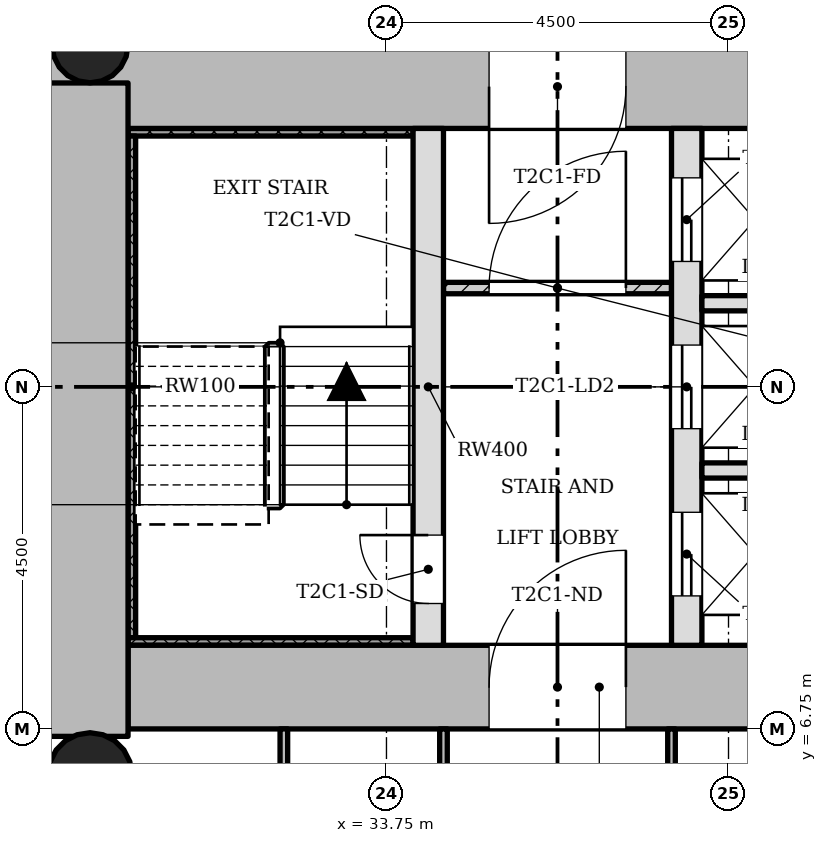
"""IFC4 building model, lengths in metres.
Left out: names, types, materials, properties, quantities, classifications, styles, units other than length and angle.
Written with IfcOpenShell. Run it as: python <this file> out.ifc"""

import sys

from ifc_helpers import new_model, si_unit, direction, frame, frame_2d, origin, origin_2d, place, context, subcontext, project, spatial, rectangle, hollow_circle, extrude, element, fill, save


model = new_model("IFC4")
c1 = context("Model", 3, precision=1e-05, world=origin(), true_north=direction((0.0, 1.0)))
c2 = subcontext(c1, "Body", "Model", "MODEL_VIEW")
j1 = project(units=[si_unit("LENGTHUNIT", "METRE"), si_unit("PLANEANGLEUNIT", "RADIAN")], contexts=[c1])
p1 = place(None, origin())
s1 = spatial("IfcSite", under=j1, at=p1, CompositionType="ELEMENT")
p2 = place(p1, origin())
s2 = spatial("IfcBuilding", under=s1, at=p2, CompositionType="ELEMENT")
p3 = place(p2, frame((0.0, 0.0, 44.9)))
s3 = spatial("IfcBuildingStorey", under=s2, at=p3, CompositionType="ELEMENT", Elevation=44.9)
p4 = place(p3, frame((30.35, 7.3, 0.0), z_axis=(0.0, 0.0, 1.0), x_axis=(1.0, 0.0, 0.0)))
e1 = element("IfcWall", 1, at=p4, inside=s3, PredefinedType="SHEAR", context=c2, shape_type="SweptSolid", body=[
    extrude(rectangle(XDim=12.4, YDim=1.1, at=frame_2d((6.2, 0.0))), origin(), (0.0, 0.0, 1.0), 3.4),
])
p5 = place(p4, frame((4.75, 0.0, 0.0)))
e2 = element("IfcOpeningElement", 2, at=p5, cuts=e1, PredefinedType="OPENING", context=c2, shape_type="SweptSolid", body=[
    extrude(rectangle(XDim=1.8, YDim=2.1, at=frame_2d((0.9, 1.05))), frame((0.0, 0.56, 0.0), z_axis=(0.0, -1.0, 0.0), x_axis=(1.0, 0.0, 0.0)), (0.0, 0.0, 1.0), 1.12),
])
p6 = place(p3, frame((41.65, 15.2, 0.0), z_axis=(0.0, 0.0, 1.0), x_axis=(-1.0, 0.0, 0.0)))
e3 = element("IfcWall", 3, at=p6, inside=s3, PredefinedType="SHEAR", context=c2, shape_type="SweptSolid", body=[
    extrude(rectangle(XDim=12.4, YDim=1.1, at=frame_2d((6.2, 0.0))), origin(), (0.0, 0.0, 1.0), 3.4),
])
p7 = place(p6, frame((4.75, 0.0, 0.0)))
e4 = element("IfcOpeningElement", 4, at=p7, cuts=e3, PredefinedType="OPENING", context=c2, shape_type="SweptSolid", body=[
    extrude(rectangle(XDim=1.8, YDim=2.1, at=frame_2d((0.9, 1.05))), frame((0.0, 0.56, 0.0), z_axis=(0.0, -1.0, 0.0), x_axis=(1.0, 0.0, 0.0)), (0.0, 0.0, 1.0), 1.12),
])
p8 = place(p3, frame((29.8, 15.248, 0.0), z_axis=(0.0, 0.0, 1.0), x_axis=(0.0, -1.0, 0.0)))
e5 = element("IfcWall", 5, at=p8, inside=s3, PredefinedType="SHEAR", context=c2, shape_type="SweptSolid", body=[
    extrude(rectangle(XDim=8.596, YDim=1.1, at=frame_2d((4.298, 0.0))), origin(), (0.0, 0.0, 1.0), 3.4),
])
p9 = place(p3, frame((34.3, 7.85, 0.0), z_axis=(0.0, 0.0, 1.0), x_axis=(0.0, 1.0, 0.0)))
e6 = element("IfcWall", 6, at=p9, inside=s3, PredefinedType="SHEAR", context=c2, shape_type="SweptSolid", body=[
    extrude(rectangle(XDim=6.8, YDim=0.4, at=frame_2d((3.4, 0.0))), origin(), (0.0, 0.0, 1.0), 3.4),
])
p10 = place(p9, frame((0.55, 0.0, 0.0)))
e7 = element("IfcOpeningElement", 7, at=p10, cuts=e6, PredefinedType="OPENING", context=c2, shape_type="SweptSolid", body=[
    extrude(rectangle(XDim=0.9, YDim=2.1, at=frame_2d((0.45, 1.05))), frame((0.0, 0.21, 0.0), z_axis=(0.0, -1.0, 0.0), x_axis=(1.0, 0.0, 0.0)), (0.0, 0.0, 1.0), 0.42),
])
p11 = place(p3, frame((37.7, 7.85, 0.0), z_axis=(0.0, 0.0, 1.0), x_axis=(0.0, 1.0, 0.0)))
e8 = element("IfcWall", 8, at=p11, inside=s3, PredefinedType="SHEAR", context=c2, shape_type="SweptSolid", body=[
    extrude(rectangle(XDim=6.8, YDim=0.4, at=frame_2d((3.4, 0.0))), origin(), (0.0, 0.0, 1.0), 3.4),
])
p12 = place(p11, frame((0.65, 0.0, 0.0)))
e9 = element("IfcOpeningElement", 9, at=p12, cuts=e8, PredefinedType="OPENING", context=c2, shape_type="SweptSolid", body=[
    extrude(rectangle(XDim=1.1, YDim=2.1, at=frame_2d((0.55, 1.05))), frame((0.0, 0.21, 0.0), z_axis=(0.0, -1.0, 0.0), x_axis=(1.0, 0.0, 0.0)), (0.0, 0.0, 1.0), 0.42),
])
p13 = place(p11, frame((2.85, 0.0, 0.0)))
e10 = element("IfcOpeningElement", 10, at=p13, cuts=e8, PredefinedType="OPENING", context=c2, shape_type="SweptSolid", body=[
    extrude(rectangle(XDim=1.1, YDim=2.1, at=frame_2d((0.55, 1.05))), frame((0.0, 0.21, 0.0), z_axis=(0.0, -1.0, 0.0), x_axis=(1.0, 0.0, 0.0)), (0.0, 0.0, 1.0), 0.42),
])
p14 = place(p11, frame((5.05, 0.0, 0.0)))
e11 = element("IfcOpeningElement", 11, at=p14, cuts=e8, PredefinedType="OPENING", context=c2, shape_type="SweptSolid", body=[
    extrude(rectangle(XDim=1.1, YDim=2.1, at=frame_2d((0.55, 1.05))), frame((0.0, 0.21, 0.0), z_axis=(0.0, -1.0, 0.0), x_axis=(1.0, 0.0, 0.0)), (0.0, 0.0, 1.0), 0.42),
])
p15 = place(p3, frame((29.85, 15.75, 0.0), z_axis=(0.0, 0.0, 1.0), x_axis=(1.0, 0.0, 0.0)))
e12 = element("IfcColumn", 12, at=p15, inside=s3, PredefinedType="COLUMN", context=c2, shape_type="SweptSolid", body=[
    extrude(hollow_circle(Radius=0.5, WallThickness=0.036, at=origin_2d()), origin(), (0.0, 0.0, 1.0), 3.4),
])
p16 = place(p3, frame((29.85, 6.15, 0.0), z_axis=(0.0, 0.0, 1.0), x_axis=(1.0, 0.0, 0.0)))
e13 = element("IfcColumn", 13, at=p16, inside=s3, PredefinedType="COLUMN", context=c2, shape_type="SweptSolid", body=[
    extrude(hollow_circle(Radius=0.55, WallThickness=0.04, at=origin_2d()), origin(), (0.0, 0.0, 1.0), 3.4),
])
p17 = place(p3, frame((37.5, 12.55, 0.0), z_axis=(0.0, 0.0, 1.0), x_axis=(-1.0, 0.0, 0.0)))
e14 = element("IfcWall", 14, at=p17, inside=s3, PredefinedType="PARTITIONING", context=c2, shape_type="SweptSolid", body=[
    extrude(rectangle(XDim=3.0, YDim=0.15, at=frame_2d((1.5, 0.0))), origin(), (0.0, 0.0, 1.0), 3.0),
])
p18 = place(p17, frame((0.6, 0.0, 0.0)))
e15 = element("IfcOpeningElement", 15, at=p18, cuts=e14, PredefinedType="OPENING", context=c2, shape_type="SweptSolid", body=[
    extrude(rectangle(XDim=1.8, YDim=2.1, at=frame_2d((0.9, 1.05))), frame((0.0, 0.085, 0.0), z_axis=(0.0, -1.0, 0.0), x_axis=(1.0, 0.0, 0.0)), (0.0, 0.0, 1.0), 0.17),
])
for number, where, z_axis, x_axis in (
    (16, (41.65, 10.15, 0.0), (0.0, 0.0, 1.0), (-1.0, 0.0, 0.0)),
    (17, (41.65, 12.35, 0.0), (0.0, 0.0, 1.0), (-1.0, 0.0, 0.0)),
):
    element("IfcWall", number, at=place(p3, frame(where, z_axis=z_axis, x_axis=x_axis)), inside=s3, PredefinedType="SOLIDWALL", context=c2, shape_type="SweptSolid", body=[
        extrude(rectangle(XDim=3.75, YDim=0.2, at=frame_2d((1.875, 0.0))), origin(), (0.0, 0.0, 1.0), 3.0),
    ])
p19 = place(p3, frame((37.5, 0.9, 0.0), z_axis=(0.0, 0.0, 1.0), x_axis=(0.0, 1.0, 0.0)))
e18 = element("IfcWall", 18, at=p19, inside=s3, PredefinedType="PARTITIONING", context=c2, shape_type="SweptSolid", body=[
    extrude(rectangle(XDim=5.85, YDim=0.1, at=frame_2d((2.925, 0.0))), origin(), (0.0, 0.0, 1.0), 3.0),
])
p20 = place(p19, frame((2.475, 0.0, 0.0)))
e19 = element("IfcOpeningElement", 19, at=p20, cuts=e18, PredefinedType="OPENING", context=c2, shape_type="SweptSolid", body=[
    extrude(rectangle(XDim=0.9, YDim=2.1, at=frame_2d((0.45, 1.05))), frame((0.0, 0.06, 0.0), z_axis=(0.0, -1.0, 0.0), x_axis=(1.0, 0.0, 0.0)), (0.0, 0.0, 1.0), 0.12),
])
p21 = place(p3, frame((34.5, 0.9, 0.0), z_axis=(0.0, 0.0, 1.0), x_axis=(0.0, 1.0, 0.0)))
e20 = element("IfcWall", 20, at=p21, inside=s3, PredefinedType="PARTITIONING", context=c2, shape_type="SweptSolid", body=[
    extrude(rectangle(XDim=5.85, YDim=0.1, at=frame_2d((2.925, 0.0))), origin(), (0.0, 0.0, 1.0), 3.0),
])
p22 = place(p21, frame((2.475, 0.0, 0.0)))
e21 = element("IfcOpeningElement", 21, at=p22, cuts=e20, PredefinedType="OPENING", context=c2, shape_type="SweptSolid", body=[
    extrude(rectangle(XDim=0.9, YDim=2.1, at=frame_2d((0.45, 1.05))), frame((0.0, 0.06, 0.0), z_axis=(0.0, -1.0, 0.0), x_axis=(1.0, 0.0, 0.0)), (0.0, 0.0, 1.0), 0.12),
])
p23 = place(p3, frame((32.4, 0.9, 0.0), z_axis=(0.0, 0.0, 1.0), x_axis=(0.0, 1.0, 0.0)))
e22 = element("IfcWall", 22, at=p23, inside=s3, PredefinedType="PARTITIONING", context=c2, shape_type="SweptSolid", body=[
    extrude(rectangle(XDim=5.85, YDim=0.1, at=frame_2d((2.925, 0.0))), origin(), (0.0, 0.0, 1.0), 3.0),
])
p24 = place(p3, frame((34.1, 14.6, 0.0), z_axis=(0.0, 0.0, 1.0), x_axis=(-1.0, 0.0, 0.0)))
e23 = element("IfcWall", 23, at=p24, inside=s3, PredefinedType="SHEAR", context=c2, shape_type="SweptSolid", body=[
    extrude(rectangle(XDim=3.75, YDim=0.1, at=frame_2d((1.875, 0.0))), origin(), (0.0, 0.0, 1.0), 3.4),
])
p25 = place(p3, frame((30.4, 7.95, 0.0), z_axis=(0.0, 0.0, 1.0), x_axis=(0.0, 1.0, 0.0)))
e24 = element("IfcWall", 24, at=p25, inside=s3, PredefinedType="SHEAR", context=c2, shape_type="SweptSolid", body=[
    extrude(rectangle(XDim=6.6, YDim=0.1, at=frame_2d((3.3, 0.0))), origin(), (0.0, 0.0, 1.0), 3.4),
])
p26 = place(p3, frame((34.1, 7.9, 0.0), z_axis=(0.0, 0.0, 1.0), x_axis=(-1.0, 0.0, 0.0)))
e25 = element("IfcWall", 25, at=p26, inside=s3, PredefinedType="SHEAR", context=c2, shape_type="SweptSolid", body=[
    extrude(rectangle(XDim=3.75, YDim=0.1, at=frame_2d((1.875, 0.0))), origin(), (0.0, 0.0, 1.0), 3.4),
])
p27 = place(p18, origin())
e26 = element("IfcDoor", 26, at=p27, inside=s3, OperationType="SINGLE_SWING_LEFT", PredefinedType="DOOR", context=c2, shape_type="SweptSolid", body=[
    extrude(rectangle(XDim=1.8, YDim=2.1, at=frame_2d((0.9, 1.05))), frame((0.0, 0.025, 0.0), z_axis=(0.0, -1.0, 0.0), x_axis=(1.0, 0.0, 0.0)), (0.0, 0.0, 1.0), 0.05),
])
fill(e15, e26)
p28 = place(p10, origin())
e27 = element("IfcDoor", 27, at=p28, inside=s3, OperationType="SINGLE_SWING_LEFT", PredefinedType="DOOR", context=c2, shape_type="SweptSolid", body=[
    extrude(rectangle(XDim=0.9, YDim=2.1, at=frame_2d((0.45, 1.05))), frame((0.0, 0.025, 0.0), z_axis=(0.0, -1.0, 0.0), x_axis=(1.0, 0.0, 0.0)), (0.0, 0.0, 1.0), 0.05),
])
fill(e7, e27)
p29 = place(p12, origin())
e28 = element("IfcDoor", 28, at=p29, inside=s3, OperationType="SLIDING_TO_LEFT", PredefinedType="DOOR", context=c2, shape_type="SweptSolid", body=[
    extrude(rectangle(XDim=1.1, YDim=2.1, at=frame_2d((0.55, 1.05))), frame((0.0, 0.025, 0.0), z_axis=(0.0, -1.0, 0.0), x_axis=(1.0, 0.0, 0.0)), (0.0, 0.0, 1.0), 0.05),
])
fill(e9, e28)
p30 = place(p13, origin())
e29 = element("IfcDoor", 29, at=p30, inside=s3, OperationType="SLIDING_TO_LEFT", PredefinedType="DOOR", context=c2, shape_type="SweptSolid", body=[
    extrude(rectangle(XDim=1.1, YDim=2.1, at=frame_2d((0.55, 1.05))), frame((0.0, 0.025, 0.0), z_axis=(0.0, -1.0, 0.0), x_axis=(1.0, 0.0, 0.0)), (0.0, 0.0, 1.0), 0.05),
])
fill(e10, e29)
p31 = place(p14, origin())
e30 = element("IfcDoor", 30, at=p31, inside=s3, OperationType="SLIDING_TO_LEFT", PredefinedType="DOOR", context=c2, shape_type="SweptSolid", body=[
    extrude(rectangle(XDim=1.1, YDim=2.1, at=frame_2d((0.55, 1.05))), frame((0.0, 0.025, 0.0), z_axis=(0.0, -1.0, 0.0), x_axis=(1.0, 0.0, 0.0)), (0.0, 0.0, 1.0), 0.05),
])
fill(e11, e30)
p32 = place(p5, origin())
e31 = element("IfcDoor", 31, at=p32, inside=s3, OperationType="SINGLE_SWING_LEFT", PredefinedType="DOOR", context=c2, shape_type="SweptSolid", body=[
    extrude(rectangle(XDim=1.8, YDim=2.1, at=frame_2d((0.9, 1.05))), frame((0.0, 0.025, 0.0), z_axis=(0.0, -1.0, 0.0), x_axis=(1.0, 0.0, 0.0)), (0.0, 0.0, 1.0), 0.05),
])
fill(e2, e31)
p33 = place(p7, origin())
e32 = element("IfcDoor", 32, at=p33, inside=s3, OperationType="SINGLE_SWING_LEFT", PredefinedType="DOOR", context=c2, shape_type="SweptSolid", body=[
    extrude(rectangle(XDim=1.8, YDim=2.1, at=frame_2d((0.9, 1.05))), frame((0.0, 0.025, 0.0), z_axis=(0.0, -1.0, 0.0), x_axis=(1.0, 0.0, 0.0)), (0.0, 0.0, 1.0), 0.05),
])
fill(e4, e32)
save(model, sys.argv[1])
